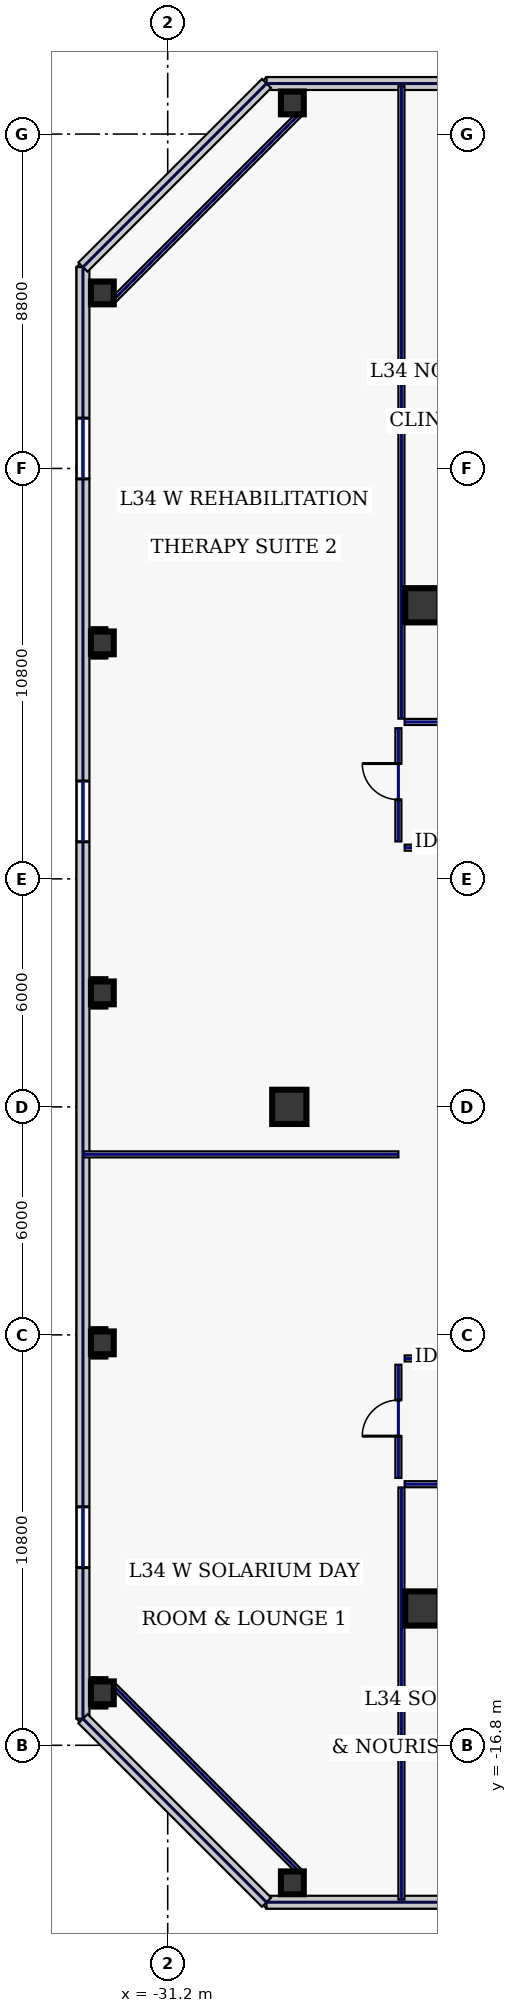
"""IFC4 building model, lengths in metres.
Left out: names, types, materials, properties, quantities, classifications, styles, units other than length and angle.
Written with IfcOpenShell. Run it as: python <this file> out.ifc"""

import sys

from ifc_helpers import new_model, si_unit, direction, frame, frame_2d, origin, origin_2d, place, context, subcontext, project, spatial, rectangle, hollow_rectangle, extrude, element, fill, save


model = new_model("IFC4")
c1 = context("Model", 3, precision=1e-05, world=origin(), true_north=direction((0.0, 1.0)))
c2 = subcontext(c1, "Body", "Model", "MODEL_VIEW")
j1 = project(units=[si_unit("LENGTHUNIT", "METRE"), si_unit("PLANEANGLEUNIT", "RADIAN")], contexts=[c1])
p1 = place(None, origin())
s1 = spatial("IfcSite", under=j1, at=p1, CompositionType="ELEMENT")
p2 = place(p1, origin())
s2 = spatial("IfcBuilding", under=s1, at=p2, CompositionType="ELEMENT")
p3 = place(p2, frame((0.0, 0.0, 152.2)))
s3 = spatial("IfcBuildingStorey", under=s2, at=p3, CompositionType="ELEMENT", Elevation=152.2)
for number, where, z_axis, x_axis in (
    (1, (-24.5, -13.2, 0.0), (0.0, 0.0, 1.0), (1.0, 0.0, 0.0)),
    (2, (-24.5, 13.2, 0.0), (0.0, 0.0, 1.0), (1.0, 0.0, 0.0)),
    (3, (-28.0, 0.0, 0.0), (0.0, 0.0, 1.0), (1.0, 0.0, 0.0)),
):
    element("IfcColumn", number, at=place(p3, frame(where, z_axis=z_axis, x_axis=x_axis)), inside=s3, PredefinedType="COLUMN", context=c2, shape_type="SweptSolid", body=[
        extrude(hollow_rectangle(XDim=0.9, YDim=0.9, WallThickness=0.04, at=origin_2d()), origin(), (0.0, 0.0, 1.0), 3.74),
    ])
for number, where, z_axis, x_axis in (
    (4, (-27.92, -20.42, 0.0), (0.0, 0.0, 1.0), (1.0, 0.0, 0.0)),
    (5, (-27.92, 26.42, 0.0), (0.0, 0.0, 1.0), (1.0, 0.0, 0.0)),
    (6, (-32.92, 21.42, 0.0), (0.0, 0.0, 1.0), (1.0, 0.0, 0.0)),
    (7, (-32.92, 12.21, 0.0), (0.0, 0.0, 1.0), (1.0, 0.0, 0.0)),
    (8, (-32.92, 3.0, 0.0), (0.0, 0.0, 1.0), (1.0, 0.0, 0.0)),
    (9, (-32.92, -6.21, 0.0), (0.0, 0.0, 1.0), (1.0, 0.0, 0.0)),
    (10, (-32.92, -15.42, 0.0), (0.0, 0.0, 1.0), (1.0, 0.0, 0.0)),
):
    element("IfcColumn", number, at=place(p3, frame(where, z_axis=z_axis, x_axis=x_axis)), inside=s3, PredefinedType="COLUMN", context=c2, shape_type="SweptSolid", body=[
        extrude(hollow_rectangle(XDim=0.6, YDim=0.6, WallThickness=0.028, at=origin_2d()), origin(), (0.0, 0.0, 1.0), 3.74),
    ])
p4 = place(p3, frame((-28.6, -20.93, 0.0), z_axis=(0.0, 0.0, 1.0), x_axis=(1.0, 0.0, 0.0)))
e11 = element("IfcWall", 11, at=p4, inside=s3, PredefinedType="STANDARD", context=c2, shape_type="SweptSolid", body=[
    extrude(rectangle(XDim=19.937, YDim=0.34, at=frame_2d((9.969, 0.0))), origin(), (0.0, 0.0, 1.0), 3.74),
])
p5 = place(p4, frame((10.882, 0.0, 0.22)))
e12 = element("IfcOpeningElement", 12, at=p5, cuts=e11, PredefinedType="OPENING", context=c2, shape_type="SweptSolid", body=[
    extrude(rectangle(XDim=1.6, YDim=1.2, at=frame_2d((0.8, 0.6))), frame((0.0, 0.18, 0.0), z_axis=(0.0, -1.0, 0.0), x_axis=(1.0, 0.0, 0.0)), (0.0, 0.0, 1.0), 0.36),
])
p6 = place(p3, frame((-8.663, 26.93, 0.0), z_axis=(0.0, 0.0, 1.0), x_axis=(-1.0, 0.0, 0.0)))
e13 = element("IfcWall", 13, at=p6, inside=s3, PredefinedType="STANDARD", context=c2, shape_type="SweptSolid", body=[
    extrude(rectangle(XDim=19.937, YDim=0.34, at=frame_2d((9.969, 0.0))), origin(), (0.0, 0.0, 1.0), 3.74),
])
p7 = place(p6, frame((7.455, 0.0, 0.22)))
e14 = element("IfcOpeningElement", 14, at=p7, cuts=e13, PredefinedType="OPENING", context=c2, shape_type="SweptSolid", body=[
    extrude(rectangle(XDim=1.6, YDim=1.2, at=frame_2d((0.8, 0.6))), frame((0.0, 0.18, 0.0), z_axis=(0.0, -1.0, 0.0), x_axis=(1.0, 0.0, 0.0)), (0.0, 0.0, 1.0), 0.36),
])
p8 = place(p3, frame((-33.43, 22.1, 0.0), z_axis=(0.0, 0.0, 1.0), x_axis=(0.0, -1.0, 0.0)))
e15 = element("IfcWall", 15, at=p8, inside=s3, PredefinedType="STANDARD", context=c2, shape_type="SweptSolid", body=[
    extrude(rectangle(XDim=38.2, YDim=0.34, at=frame_2d((19.1, 0.0))), origin(), (0.0, 0.0, 1.0), 3.74),
])
p9 = place(p8, frame((3.975, 0.0, 0.22)))
e16 = element("IfcOpeningElement", 16, at=p9, cuts=e15, PredefinedType="OPENING", context=c2, shape_type="SweptSolid", body=[
    extrude(rectangle(XDim=1.6, YDim=1.2, at=frame_2d((0.8, 0.6))), frame((0.0, 0.18, 0.0), z_axis=(0.0, -1.0, 0.0), x_axis=(1.0, 0.0, 0.0)), (0.0, 0.0, 1.0), 0.36),
])
p10 = place(p8, frame((13.525, 0.0, 0.22)))
e17 = element("IfcOpeningElement", 17, at=p10, cuts=e15, PredefinedType="OPENING", context=c2, shape_type="SweptSolid", body=[
    extrude(rectangle(XDim=1.6, YDim=1.2, at=frame_2d((0.8, 0.6))), frame((0.0, 0.18, 0.0), z_axis=(0.0, -1.0, 0.0), x_axis=(1.0, 0.0, 0.0)), (0.0, 0.0, 1.0), 0.36),
])
p11 = place(p8, frame((32.625, 0.0, 0.22)))
e18 = element("IfcOpeningElement", 18, at=p11, cuts=e15, PredefinedType="OPENING", context=c2, shape_type="SweptSolid", body=[
    extrude(rectangle(XDim=1.6, YDim=1.2, at=frame_2d((0.8, 0.6))), frame((0.0, 0.18, 0.0), z_axis=(0.0, -1.0, 0.0), x_axis=(1.0, 0.0, 0.0)), (0.0, 0.0, 1.0), 0.36),
])
for number, where, z_axis, x_axis in (
    (19, (-28.6, 26.93, 0.0), (0.0, 0.0, 1.0), (-0.707, -0.707, 0.0)),
    (20, (-33.43, -16.1, 0.0), (0.0, 0.0, 1.0), (0.707, -0.707, 0.0)),
):
    element("IfcWall", number, at=place(p3, frame(where, z_axis=z_axis, x_axis=x_axis)), inside=s3, PredefinedType="STANDARD", context=c2, shape_type="SweptSolid", body=[
        extrude(rectangle(XDim=6.83, YDim=0.34, at=frame_2d((3.415, 0.0))), origin(), (0.0, 0.0, 1.0), 3.74),
    ])
for number, where, z_axis, x_axis in (
    (21, (-27.68, 26.18, 0.0), (0.0, 0.0, 1.0), (-0.707, -0.707, 0.0)),
    (22, (-32.68, -15.18, 0.0), (0.0, 0.0, 1.0), (0.707, -0.707, 0.0)),
):
    element("IfcWall", number, at=place(p3, frame(where, z_axis=z_axis, x_axis=x_axis)), inside=s3, PredefinedType="PARTITIONING", context=c2, shape_type="SweptSolid", body=[
        extrude(rectangle(XDim=7.071, YDim=0.16, at=frame_2d((3.536, 0.0))), origin(), (0.0, 0.0, 1.0), 1.535),
    ])
p12 = place(p3, frame((-25.13, -9.765, 0.0), z_axis=(0.0, 0.0, 1.0), x_axis=(0.0, 1.0, 0.0)))
e23 = element("IfcWall", 23, at=p12, inside=s3, PredefinedType="PARTITIONING", context=c2, shape_type="SweptSolid", body=[
    extrude(rectangle(XDim=2.98, YDim=0.16, at=frame_2d((1.49, 0.0))), origin(), (0.0, 0.0, 1.0), 3.74),
])
p13 = place(p12, frame((1.1, 0.0, 0.0)))
e24 = element("IfcOpeningElement", 24, at=p13, cuts=e23, PredefinedType="OPENING", context=c2, shape_type="SweptSolid", body=[
    extrude(rectangle(XDim=0.95, YDim=2.2, at=frame_2d((0.475, 1.1))), frame((0.0, 0.09, 0.0), z_axis=(0.0, -1.0, 0.0), x_axis=(1.0, 0.0, 0.0)), (0.0, 0.0, 1.0), 0.18),
])
for number, where, z_axis, x_axis in (
    (25, (-24.965, -6.62, 0.0), (0.0, 0.0, 1.0), (1.0, 0.0, 0.0)),
    (26, (-10.63, 6.82, 0.0), (0.0, 0.0, 1.0), (-1.0, 0.0, 0.0)),
):
    element("IfcWall", number, at=place(p3, frame(where, z_axis=z_axis, x_axis=x_axis)), inside=s3, PredefinedType="PARTITIONING", context=c2, shape_type="SweptSolid", body=[
        extrude(rectangle(XDim=14.335, YDim=0.16, at=frame_2d((7.167, 0.0))), origin(), (0.0, 0.0, 1.0), 3.74),
    ])
p14 = place(p3, frame((-25.13, 6.985, 0.0), z_axis=(0.0, 0.0, 1.0), x_axis=(0.0, 1.0, 0.0)))
e27 = element("IfcWall", 27, at=p14, inside=s3, PredefinedType="PARTITIONING", context=c2, shape_type="SweptSolid", body=[
    extrude(rectangle(XDim=2.98, YDim=0.16, at=frame_2d((1.49, 0.0))), origin(), (0.0, 0.0, 1.0), 3.74),
])
p15 = place(p14, frame((1.1, 0.0, 0.0)))
e28 = element("IfcOpeningElement", 28, at=p15, cuts=e27, PredefinedType="OPENING", context=c2, shape_type="SweptSolid", body=[
    extrude(rectangle(XDim=0.95, YDim=2.2, at=frame_2d((0.475, 1.1))), frame((0.0, 0.09, 0.0), z_axis=(0.0, -1.0, 0.0), x_axis=(1.0, 0.0, 0.0)), (0.0, 0.0, 1.0), 0.18),
])
p16 = place(p3, frame((-24.965, 10.13, 0.0), z_axis=(0.0, 0.0, 1.0), x_axis=(1.0, 0.0, 0.0)))
e29 = element("IfcWall", 29, at=p16, inside=s3, PredefinedType="PARTITIONING", context=c2, shape_type="SweptSolid", body=[
    extrude(rectangle(XDim=49.93, YDim=0.16, at=frame_2d((24.965, 0.0))), origin(), (0.0, 0.0, 1.0), 3.74),
])
p17 = place(p16, frame((1.869, 0.0, 0.0)))
e30 = element("IfcOpeningElement", 30, at=p17, cuts=e29, PredefinedType="OPENING", context=c2, shape_type="SweptSolid", body=[
    extrude(rectangle(XDim=1.3, YDim=2.2, at=frame_2d((0.65, 1.1))), frame((0.0, 0.09, 0.0), z_axis=(0.0, -1.0, 0.0), x_axis=(1.0, 0.0, 0.0)), (0.0, 0.0, 1.0), 0.18),
])
p18 = place(p16, frame((7.33, 0.0, 0.0)))
e31 = element("IfcOpeningElement", 31, at=p18, cuts=e29, PredefinedType="OPENING", context=c2, shape_type="SweptSolid", body=[
    extrude(rectangle(XDim=0.95, YDim=2.2, at=frame_2d((0.475, 1.1))), frame((0.0, 0.09, 0.0), z_axis=(0.0, -1.0, 0.0), x_axis=(1.0, 0.0, 0.0)), (0.0, 0.0, 1.0), 0.18),
])
p19 = place(p16, frame((12.755, 0.0, 0.0)))
e32 = element("IfcOpeningElement", 32, at=p19, cuts=e29, PredefinedType="OPENING", context=c2, shape_type="SweptSolid", body=[
    extrude(rectangle(XDim=1.3, YDim=2.2, at=frame_2d((0.65, 1.1))), frame((0.0, 0.09, 0.0), z_axis=(0.0, -1.0, 0.0), x_axis=(1.0, 0.0, 0.0)), (0.0, 0.0, 1.0), 0.18),
])
p20 = place(p16, frame((19.225, 0.0, 0.0)))
e33 = element("IfcOpeningElement", 33, at=p20, cuts=e29, PredefinedType="OPENING", context=c2, shape_type="SweptSolid", body=[
    extrude(rectangle(XDim=0.95, YDim=2.2, at=frame_2d((0.475, 1.1))), frame((0.0, 0.09, 0.0), z_axis=(0.0, -1.0, 0.0), x_axis=(1.0, 0.0, 0.0)), (0.0, 0.0, 1.0), 0.18),
])
p21 = place(p16, frame((26.685, 0.0, 0.0)))
e34 = element("IfcOpeningElement", 34, at=p21, cuts=e29, PredefinedType="OPENING", context=c2, shape_type="SweptSolid", body=[
    extrude(rectangle(XDim=1.15, YDim=2.2, at=frame_2d((0.575, 1.1))), frame((0.0, 0.09, 0.0), z_axis=(0.0, -1.0, 0.0), x_axis=(1.0, 0.0, 0.0)), (0.0, 0.0, 1.0), 0.18),
])
p22 = place(p16, frame((33.0, 0.0, 0.0)))
e35 = element("IfcOpeningElement", 35, at=p22, cuts=e29, PredefinedType="OPENING", context=c2, shape_type="SweptSolid", body=[
    extrude(rectangle(XDim=1.05, YDim=2.2, at=frame_2d((0.525, 1.1))), frame((0.0, 0.09, 0.0), z_axis=(0.0, -1.0, 0.0), x_axis=(1.0, 0.0, 0.0)), (0.0, 0.0, 1.0), 0.18),
])
p23 = place(p16, frame((39.225, 0.0, 0.0)))
e36 = element("IfcOpeningElement", 36, at=p23, cuts=e29, PredefinedType="OPENING", context=c2, shape_type="SweptSolid", body=[
    extrude(rectangle(XDim=1.3, YDim=2.2, at=frame_2d((0.65, 1.1))), frame((0.0, 0.09, 0.0), z_axis=(0.0, -1.0, 0.0), x_axis=(1.0, 0.0, 0.0)), (0.0, 0.0, 1.0), 0.18),
])
p24 = place(p16, frame((45.631, 0.0, 0.0)))
e37 = element("IfcOpeningElement", 37, at=p24, cuts=e29, PredefinedType="OPENING", context=c2, shape_type="SweptSolid", body=[
    extrude(rectangle(XDim=1.3, YDim=2.2, at=frame_2d((0.65, 1.1))), frame((0.0, 0.09, 0.0), z_axis=(0.0, -1.0, 0.0), x_axis=(1.0, 0.0, 0.0)), (0.0, 0.0, 1.0), 0.18),
])
p25 = place(p3, frame((24.965, -9.93, 0.0), z_axis=(0.0, 0.0, 1.0), x_axis=(-1.0, 0.0, 0.0)))
e38 = element("IfcWall", 38, at=p25, inside=s3, PredefinedType="PARTITIONING", context=c2, shape_type="SweptSolid", body=[
    extrude(rectangle(XDim=49.93, YDim=0.16, at=frame_2d((24.965, 0.0))), origin(), (0.0, 0.0, 1.0), 3.74),
])
p26 = place(p25, frame((47.106, 0.0, 0.0)))
e39 = element("IfcOpeningElement", 39, at=p26, cuts=e38, PredefinedType="OPENING", context=c2, shape_type="SweptSolid", body=[
    extrude(rectangle(XDim=0.95, YDim=2.2, at=frame_2d((0.475, 1.1))), frame((0.0, 0.09, 0.0), z_axis=(0.0, -1.0, 0.0), x_axis=(1.0, 0.0, 0.0)), (0.0, 0.0, 1.0), 0.18),
])
p27 = place(p25, frame((40.67, 0.0, 0.0)))
e40 = element("IfcOpeningElement", 40, at=p27, cuts=e38, PredefinedType="OPENING", context=c2, shape_type="SweptSolid", body=[
    extrude(rectangle(XDim=1.45, YDim=2.2, at=frame_2d((0.725, 1.1))), frame((0.0, 0.09, 0.0), z_axis=(0.0, -1.0, 0.0), x_axis=(1.0, 0.0, 0.0)), (0.0, 0.0, 1.0), 0.18),
])
p28 = place(p25, frame((33.23, 0.0, 0.0)))
e41 = element("IfcOpeningElement", 41, at=p28, cuts=e38, PredefinedType="OPENING", context=c2, shape_type="SweptSolid", body=[
    extrude(rectangle(XDim=1.3, YDim=2.2, at=frame_2d((0.65, 1.1))), frame((0.0, 0.09, 0.0), z_axis=(0.0, -1.0, 0.0), x_axis=(1.0, 0.0, 0.0)), (0.0, 0.0, 1.0), 0.18),
])
p29 = place(p25, frame((26.505, 0.0, 0.0)))
e42 = element("IfcOpeningElement", 42, at=p29, cuts=e38, PredefinedType="OPENING", context=c2, shape_type="SweptSolid", body=[
    extrude(rectangle(XDim=1.3, YDim=2.2, at=frame_2d((0.65, 1.1))), frame((0.0, 0.09, 0.0), z_axis=(0.0, -1.0, 0.0), x_axis=(1.0, 0.0, 0.0)), (0.0, 0.0, 1.0), 0.18),
])
p30 = place(p25, frame((21.925, 0.0, 0.0)))
e43 = element("IfcOpeningElement", 43, at=p30, cuts=e38, PredefinedType="OPENING", context=c2, shape_type="SweptSolid", body=[
    extrude(rectangle(XDim=0.95, YDim=2.2, at=frame_2d((0.475, 1.1))), frame((0.0, 0.09, 0.0), z_axis=(0.0, -1.0, 0.0), x_axis=(1.0, 0.0, 0.0)), (0.0, 0.0, 1.0), 0.18),
])
p31 = place(p25, frame((14.637, 0.0, 0.0)))
e44 = element("IfcOpeningElement", 44, at=p31, cuts=e38, PredefinedType="OPENING", context=c2, shape_type="SweptSolid", body=[
    extrude(rectangle(XDim=0.95, YDim=2.2, at=frame_2d((0.475, 1.1))), frame((0.0, 0.09, 0.0), z_axis=(0.0, -1.0, 0.0), x_axis=(1.0, 0.0, 0.0)), (0.0, 0.0, 1.0), 0.18),
])
p32 = place(p25, frame((7.512, 0.0, 0.0)))
e45 = element("IfcOpeningElement", 45, at=p32, cuts=e38, PredefinedType="OPENING", context=c2, shape_type="SweptSolid", body=[
    extrude(rectangle(XDim=0.95, YDim=2.2, at=frame_2d((0.475, 1.1))), frame((0.0, 0.09, 0.0), z_axis=(0.0, -1.0, 0.0), x_axis=(1.0, 0.0, 0.0)), (0.0, 0.0, 1.0), 0.18),
])
p33 = place(p25, frame((2.044, 0.0, 0.0)))
e46 = element("IfcOpeningElement", 46, at=p33, cuts=e38, PredefinedType="OPENING", context=c2, shape_type="SweptSolid", body=[
    extrude(rectangle(XDim=1.05, YDim=2.2, at=frame_2d((0.525, 1.1))), frame((0.0, 0.09, 0.0), z_axis=(0.0, -1.0, 0.0), x_axis=(1.0, 0.0, 0.0)), (0.0, 0.0, 1.0), 0.18),
])
p34 = place(p3, frame((-25.05, 10.215, 0.0), z_axis=(0.0, 0.0, 1.0), x_axis=(0.0, 1.0, 0.0)))
e47 = element("IfcWall", 47, at=p34, inside=s3, PredefinedType="PARTITIONING", context=c2, shape_type="SweptSolid", body=[
    extrude(rectangle(XDim=16.645, YDim=0.16, at=frame_2d((8.323, 0.0))), origin(), (0.0, 0.0, 1.0), 2.135),
])
p35 = place(p3, frame((-25.05, -20.86, 0.0), z_axis=(0.0, 0.0, 1.0), x_axis=(0.0, 1.0, 0.0)))
e48 = element("IfcWall", 48, at=p35, inside=s3, PredefinedType="PARTITIONING", context=c2, shape_type="SweptSolid", body=[
    extrude(rectangle(XDim=10.845, YDim=0.16, at=frame_2d((5.423, 0.0))), origin(), (0.0, 0.0, 1.0), 3.74),
])
p36 = place(p3, frame((-33.41, -1.25, 0.0), z_axis=(0.0, 0.0, 1.0), x_axis=(1.0, 0.0, 0.0)))
e49 = element("IfcWall", 49, at=p36, inside=s3, PredefinedType="PARTITIONING", context=c2, shape_type="SweptSolid", body=[
    extrude(rectangle(XDim=8.28, YDim=0.16, at=frame_2d((4.14, 0.0))), origin(), (0.0, 0.0, 1.0), 3.74),
])
p37 = place(p9, origin())
e50 = element("IfcWindow", 50, at=p37, inside=s3, PartitioningType="SINGLE_PANEL", PredefinedType="WINDOW", context=c2, shape_type="SweptSolid", body=[
    extrude(rectangle(XDim=1.6, YDim=1.2, at=frame_2d((0.8, 0.6))), frame((0.0, 0.03, 0.0), z_axis=(0.0, -1.0, 0.0), x_axis=(1.0, 0.0, 0.0)), (0.0, 0.0, 1.0), 0.06),
])
fill(e16, e50)
p38 = place(p10, origin())
e51 = element("IfcWindow", 51, at=p38, inside=s3, PartitioningType="SINGLE_PANEL", PredefinedType="WINDOW", context=c2, shape_type="SweptSolid", body=[
    extrude(rectangle(XDim=1.6, YDim=1.2, at=frame_2d((0.8, 0.6))), frame((0.0, 0.03, 0.0), z_axis=(0.0, -1.0, 0.0), x_axis=(1.0, 0.0, 0.0)), (0.0, 0.0, 1.0), 0.06),
])
fill(e17, e51)
p39 = place(p11, origin())
e52 = element("IfcWindow", 52, at=p39, inside=s3, PartitioningType="SINGLE_PANEL", PredefinedType="WINDOW", context=c2, shape_type="SweptSolid", body=[
    extrude(rectangle(XDim=1.6, YDim=1.2, at=frame_2d((0.8, 0.6))), frame((0.0, 0.03, 0.0), z_axis=(0.0, -1.0, 0.0), x_axis=(1.0, 0.0, 0.0)), (0.0, 0.0, 1.0), 0.06),
])
fill(e18, e52)
p40 = place(p13, origin())
e53 = element("IfcDoor", 53, at=p40, inside=s3, OperationType="SINGLE_SWING_LEFT", PredefinedType="DOOR", context=c2, shape_type="SweptSolid", body=[
    extrude(rectangle(XDim=0.95, YDim=2.2, at=frame_2d((0.475, 1.1))), frame((0.0, 0.025, 0.0), z_axis=(0.0, -1.0, 0.0), x_axis=(1.0, 0.0, 0.0)), (0.0, 0.0, 1.0), 0.05),
])
fill(e24, e53)
p41 = place(p15, origin())
e54 = element("IfcDoor", 54, at=p41, inside=s3, OperationType="SINGLE_SWING_RIGHT", PredefinedType="DOOR", context=c2, shape_type="SweptSolid", body=[
    extrude(rectangle(XDim=0.95, YDim=2.2, at=frame_2d((0.475, 1.1))), frame((0.0, 0.025, 0.0), z_axis=(0.0, -1.0, 0.0), x_axis=(1.0, 0.0, 0.0)), (0.0, 0.0, 1.0), 0.05),
])
fill(e28, e54)
save(model, sys.argv[1])
